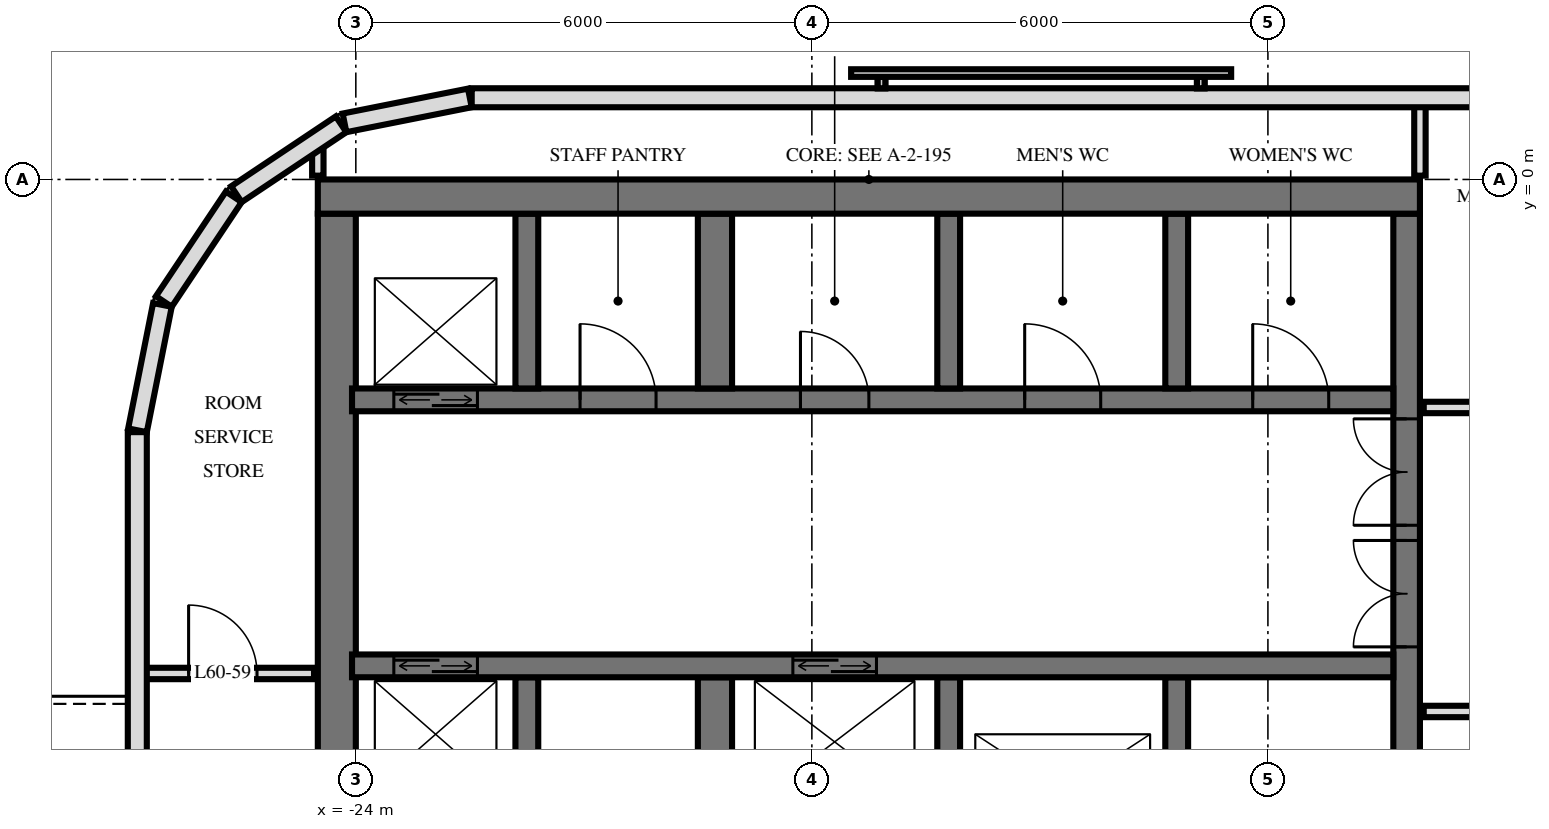
"""IFC4 building model, lengths in metres.
Left out: names, types, materials, properties, quantities, classifications, styles, units other than length and angle.
Written with IfcOpenShell. Run it as: python <this file> out.ifc"""

import sys

from ifc_helpers import new_model, si_unit, direction, frame, frame_2d, origin, place, context, subcontext, project, spatial, rectangle, extrude, element, fill, save


model = new_model("IFC4")
c1 = context("Model", 3, precision=1e-05, world=origin(), true_north=direction((0.0, 1.0)))
c2 = subcontext(c1, "Body", "Model", "MODEL_VIEW")
j1 = project(units=[si_unit("LENGTHUNIT", "METRE"), si_unit("PLANEANGLEUNIT", "RADIAN")], contexts=[c1])
p1 = place(None, origin())
s1 = spatial("IfcSite", under=j1, at=p1, CompositionType="ELEMENT")
p2 = place(p1, origin())
s2 = spatial("IfcBuilding", under=s1, at=p2, CompositionType="ELEMENT")
p3 = place(p2, frame((0.0, 0.0, 229.1)))
s3 = spatial("IfcBuildingStorey", under=s2, at=p3, CompositionType="ELEMENT", Elevation=229.1)
p4 = place(p3, frame((-24.5, -0.225, 0.0), z_axis=(0.0, 0.0, 1.0), x_axis=(1.0, 0.0, 0.0)))
e1 = element("IfcWall", 1, at=p4, inside=s3, PredefinedType="SHEAR", context=c2, shape_type="SweptSolid", body=[
    extrude(rectangle(XDim=14.5, YDim=0.45, at=frame_2d((7.25, 0.0))), origin(), (0.0, 0.0, 1.0), 3.5),
])
p5 = place(p3, frame((-10.175, -14.55, 0.0), z_axis=(0.0, 0.0, 1.0), x_axis=(0.0, 1.0, 0.0)))
e2 = element("IfcWall", 2, at=p5, inside=s3, PredefinedType="SHEAR", context=c2, shape_type="SweptSolid", body=[
    extrude(rectangle(XDim=14.1, YDim=0.35, at=frame_2d((7.05, 0.0))), origin(), (0.0, 0.0, 1.0), 3.5),
])
p6 = place(p5, frame((8.4, 0.0, 0.0)))
e3 = element("IfcOpeningElement", 3, at=p6, cuts=e2, PredefinedType="OPENING", context=c2, shape_type="SweptSolid", body=[
    extrude(rectangle(XDim=1.4, YDim=2.4, at=frame_2d((0.7, 1.2))), frame((0.0, 0.185, 0.0), z_axis=(0.0, -1.0, 0.0), x_axis=(1.0, 0.0, 0.0)), (0.0, 0.0, 1.0), 0.37),
])
p7 = place(p5, frame((10.0, 0.0, 0.0)))
e4 = element("IfcOpeningElement", 4, at=p7, cuts=e2, PredefinedType="OPENING", context=c2, shape_type="SweptSolid", body=[
    extrude(rectangle(XDim=1.4, YDim=2.4, at=frame_2d((0.7, 1.2))), frame((0.0, 0.185, 0.0), z_axis=(0.0, -1.0, 0.0), x_axis=(1.0, 0.0, 0.0)), (0.0, 0.0, 1.0), 0.37),
])
p8 = place(p5, frame((4.0, 0.0, 0.0)))
e5 = element("IfcOpeningElement", 5, at=p8, cuts=e2, PredefinedType="OPENING", context=c2, shape_type="SweptSolid", body=[
    extrude(rectangle(XDim=1.2, YDim=2.1, at=frame_2d((0.6, 1.05))), frame((0.0, 0.185, 0.0), z_axis=(0.0, -1.0, 0.0), x_axis=(1.0, 0.0, 0.0)), (0.0, 0.0, 1.0), 0.37),
])
p9 = place(p3, frame((-24.25, -14.55, 0.0), z_axis=(0.0, 0.0, 1.0), x_axis=(0.0, 1.0, 0.0)))
e6 = element("IfcWall", 6, at=p9, inside=s3, PredefinedType="SHEAR", context=c2, shape_type="SweptSolid", body=[
    extrude(rectangle(XDim=14.1, YDim=0.5, at=frame_2d((7.05, 0.0))), origin(), (0.0, 0.0, 1.0), 3.5),
])
p10 = place(p3, frame((-24.05, -2.9, 0.0), z_axis=(0.0, 0.0, 1.0), x_axis=(1.0, 0.0, 0.0)))
e7 = element("IfcWall", 7, at=p10, inside=s3, PredefinedType="SHEAR", context=c2, shape_type="SweptSolid", body=[
    extrude(rectangle(XDim=13.7, YDim=0.3, at=frame_2d((6.85, 0.0))), origin(), (0.0, 0.0, 1.0), 3.5),
])
p11 = place(p10, frame((0.55, 0.0, 0.0)))
e8 = element("IfcOpeningElement", 8, at=p11, cuts=e7, PredefinedType="OPENING", context=c2, shape_type="SweptSolid", body=[
    extrude(rectangle(XDim=1.1, YDim=2.1, at=frame_2d((0.55, 1.05))), frame((0.0, 0.16, 0.0), z_axis=(0.0, -1.0, 0.0), x_axis=(1.0, 0.0, 0.0)), (0.0, 0.0, 1.0), 0.32),
])
p12 = place(p10, frame((5.9, 0.0, 0.0)))
e9 = element("IfcOpeningElement", 9, at=p12, cuts=e7, PredefinedType="OPENING", context=c2, shape_type="SweptSolid", body=[
    extrude(rectangle(XDim=0.9, YDim=2.1, at=frame_2d((0.45, 1.05))), frame((0.0, 0.16, 0.0), z_axis=(0.0, -1.0, 0.0), x_axis=(1.0, 0.0, 0.0)), (0.0, 0.0, 1.0), 0.32),
])
p13 = place(p10, frame((11.85, 0.0, 0.0)))
e10 = element("IfcOpeningElement", 10, at=p13, cuts=e7, PredefinedType="OPENING", context=c2, shape_type="SweptSolid", body=[
    extrude(rectangle(XDim=1.0, YDim=2.1, at=frame_2d((0.5, 1.05))), frame((0.0, 0.16, 0.0), z_axis=(0.0, -1.0, 0.0), x_axis=(1.0, 0.0, 0.0)), (0.0, 0.0, 1.0), 0.32),
])
p14 = place(p10, frame((8.85, 0.0, 0.0)))
e11 = element("IfcOpeningElement", 11, at=p14, cuts=e7, PredefinedType="OPENING", context=c2, shape_type="SweptSolid", body=[
    extrude(rectangle(XDim=1.0, YDim=2.1, at=frame_2d((0.5, 1.05))), frame((0.0, 0.16, 0.0), z_axis=(0.0, -1.0, 0.0), x_axis=(1.0, 0.0, 0.0)), (0.0, 0.0, 1.0), 0.32),
])
p15 = place(p10, frame((3.0, 0.0, 0.0)))
e12 = element("IfcOpeningElement", 12, at=p15, cuts=e7, PredefinedType="OPENING", context=c2, shape_type="SweptSolid", body=[
    extrude(rectangle(XDim=1.0, YDim=2.1, at=frame_2d((0.5, 1.05))), frame((0.0, 0.16, 0.0), z_axis=(0.0, -1.0, 0.0), x_axis=(1.0, 0.0, 0.0)), (0.0, 0.0, 1.0), 0.32),
])
p16 = place(p3, frame((-24.05, -6.4, 0.0), z_axis=(0.0, 0.0, 1.0), x_axis=(1.0, 0.0, 0.0)))
e13 = element("IfcWall", 13, at=p16, inside=s3, PredefinedType="SHEAR", context=c2, shape_type="SweptSolid", body=[
    extrude(rectangle(XDim=13.7, YDim=0.3, at=frame_2d((6.85, 0.0))), origin(), (0.0, 0.0, 1.0), 3.5),
])
p17 = place(p16, frame((0.55, 0.0, 0.0)))
e14 = element("IfcOpeningElement", 14, at=p17, cuts=e13, PredefinedType="OPENING", context=c2, shape_type="SweptSolid", body=[
    extrude(rectangle(XDim=1.1, YDim=2.1, at=frame_2d((0.55, 1.05))), frame((0.0, 0.16, 0.0), z_axis=(0.0, -1.0, 0.0), x_axis=(1.0, 0.0, 0.0)), (0.0, 0.0, 1.0), 0.32),
])
p18 = place(p16, frame((5.8, 0.0, 0.0)))
e15 = element("IfcOpeningElement", 15, at=p18, cuts=e13, PredefinedType="OPENING", context=c2, shape_type="SweptSolid", body=[
    extrude(rectangle(XDim=1.1, YDim=2.1, at=frame_2d((0.55, 1.05))), frame((0.0, 0.16, 0.0), z_axis=(0.0, -1.0, 0.0), x_axis=(1.0, 0.0, 0.0)), (0.0, 0.0, 1.0), 0.32),
])
for number, where, z_axis, x_axis in (
    (16, (-13.2, -2.75, 0.0), (0.0, 0.0, 1.0), (0.0, 1.0, 0.0)),
    (17, (-13.2, -8.85, 0.0), (0.0, 0.0, 1.0), (0.0, 1.0, 0.0)),
    (18, (-16.2, -2.75, 0.0), (0.0, 0.0, 1.0), (0.0, 1.0, 0.0)),
    (19, (-16.2, -8.85, 0.0), (0.0, 0.0, 1.0), (0.0, 1.0, 0.0)),
):
    element("IfcWall", number, at=place(p3, frame(where, z_axis=z_axis, x_axis=x_axis)), inside=s3, PredefinedType="SHEAR", context=c2, shape_type="SweptSolid", body=[
        extrude(rectangle(XDim=2.3, YDim=0.3, at=frame_2d((1.15, 0.0))), origin(), (0.0, 0.0, 1.0), 3.5),
    ])
for number, where, z_axis, x_axis in (
    (20, (-19.275, -2.75, 0.0), (0.0, 0.0, 1.0), (0.0, 1.0, 0.0)),
    (21, (-19.275, -8.85, 0.0), (0.0, 0.0, 1.0), (0.0, 1.0, 0.0)),
):
    element("IfcWall", number, at=place(p3, frame(where, z_axis=z_axis, x_axis=x_axis)), inside=s3, PredefinedType="SHEAR", context=c2, shape_type="SweptSolid", body=[
        extrude(rectangle(XDim=2.3, YDim=0.45, at=frame_2d((1.15, 0.0))), origin(), (0.0, 0.0, 1.0), 3.5),
    ])
for number, where, z_axis, x_axis in (
    (22, (-21.75, -2.75, 0.0), (0.0, 0.0, 1.0), (0.0, 1.0, 0.0)),
    (23, (-21.75, -8.85, 0.0), (0.0, 0.0, 1.0), (0.0, 1.0, 0.0)),
):
    element("IfcWall", number, at=place(p3, frame(where, z_axis=z_axis, x_axis=x_axis)), inside=s3, PredefinedType="SHEAR", context=c2, shape_type="SweptSolid", body=[
        extrude(rectangle(XDim=2.3, YDim=0.3, at=frame_2d((1.15, 0.0))), origin(), (0.0, 0.0, 1.0), 3.5),
    ])
p19 = place(p3, frame((22.475, 1.075, 0.0), z_axis=(0.0, 0.0, 1.0), x_axis=(-1.0, 0.0, 0.0)))
e24 = element("IfcWall", 24, at=p19, inside=s3, PredefinedType="SOLIDWALL", context=c2, shape_type="SweptSolid", body=[
    extrude(rectangle(XDim=44.951, YDim=0.25, at=frame_2d((22.475, 0.0))), origin(), (0.0, 0.0, 1.0), 3.22),
])
p20 = place(p19, frame((15.275, 0.0, 0.9)))
e25 = element("IfcOpeningElement", 25, at=p20, cuts=e24, PredefinedType="OPENING", context=c2, shape_type="SweptSolid", body=[
    extrude(rectangle(XDim=2.4, YDim=1.5, at=frame_2d((1.2, 0.75))), frame((0.0, 0.135, 0.0), z_axis=(0.0, -1.0, 0.0), x_axis=(1.0, 0.0, 0.0)), (0.0, 0.0, 1.0), 0.27),
])
p21 = place(p19, frame((18.275, 0.0, 0.9)))
e26 = element("IfcOpeningElement", 26, at=p21, cuts=e24, PredefinedType="OPENING", context=c2, shape_type="SweptSolid", body=[
    extrude(rectangle(XDim=2.4, YDim=1.5, at=frame_2d((1.2, 0.75))), frame((0.0, 0.135, 0.0), z_axis=(0.0, -1.0, 0.0), x_axis=(1.0, 0.0, 0.0)), (0.0, 0.0, 1.0), 0.27),
])
p22 = place(p19, frame((29.275, 0.0, 0.9)))
e27 = element("IfcOpeningElement", 27, at=p22, cuts=e24, PredefinedType="OPENING", context=c2, shape_type="SweptSolid", body=[
    extrude(rectangle(XDim=2.4, YDim=1.5, at=frame_2d((1.2, 0.75))), frame((0.0, 0.135, 0.0), z_axis=(0.0, -1.0, 0.0), x_axis=(1.0, 0.0, 0.0)), (0.0, 0.0, 1.0), 0.27),
])
p23 = place(p3, frame((-22.5, 1.073, 0.0), z_axis=(0.0, 0.0, 1.0), x_axis=(-0.980803419081, -0.194999110559, 0.0)))
e28 = element("IfcWall", 28, at=p23, inside=s3, PredefinedType="SOLIDWALL", context=c2, shape_type="SweptSolid", body=[
    extrude(rectangle(XDim=1.681, YDim=0.25, at=frame_2d((0.841, 0.0))), origin(), (0.0, 0.0, 1.0), 3.22),
])
for number, where, z_axis, x_axis in (
    (29, (-24.194, 0.726, 0.0), (0.0, 0.0, 1.0), (-0.831, -0.556, 0.0)),
    (30, (-25.606, -0.229, 0.0), (0.0, 0.0, 1.0), (-0.556, -0.831, 0.0)),
):
    element("IfcWall", number, at=place(p3, frame(where, z_axis=z_axis, x_axis=x_axis)), inside=s3, PredefinedType="SOLIDWALL", context=c2, shape_type="SweptSolid", body=[
        extrude(rectangle(XDim=1.656, YDim=0.25, at=frame_2d((0.828, 0.0))), origin(), (0.0, 0.0, 1.0), 3.22),
    ])
p24 = place(p3, frame((-26.545, -1.651, 0.0), z_axis=(0.0, 0.0, 1.0), x_axis=(-0.194999110559, -0.980803419081, 0.0)))
e31 = element("IfcWall", 31, at=p24, inside=s3, PredefinedType="SOLIDWALL", context=c2, shape_type="SweptSolid", body=[
    extrude(rectangle(XDim=1.681, YDim=0.25, at=frame_2d((0.841, 0.0))), origin(), (0.0, 0.0, 1.0), 3.22),
])
p25 = place(p3, frame((-26.875, -3.325, 0.0), z_axis=(0.0, 0.0, 1.0), x_axis=(0.0, -1.0, 0.0)))
e32 = element("IfcWall", 32, at=p25, inside=s3, PredefinedType="SOLIDWALL", context=c2, shape_type="SweptSolid", body=[
    extrude(rectangle(XDim=21.551, YDim=0.25, at=frame_2d((10.775, 0.0))), origin(), (0.0, 0.0, 1.0), 3.22),
])
p26 = place(p25, frame((6.575, 0.0, 0.0)))
e33 = element("IfcOpeningElement", 33, at=p26, cuts=e32, PredefinedType="OPENING", context=c2, shape_type="SweptSolid", body=[
    extrude(rectangle(XDim=1.8, YDim=2.4, at=frame_2d((0.9, 1.2))), frame((0.0, 0.135, 0.0), z_axis=(0.0, -1.0, 0.0), x_axis=(1.0, 0.0, 0.0)), (0.0, 0.0, 1.0), 0.27),
])
p27 = place(p25, frame((9.425, 0.0, 0.9)))
e34 = element("IfcOpeningElement", 34, at=p27, cuts=e32, PredefinedType="OPENING", context=c2, shape_type="SweptSolid", body=[
    extrude(rectangle(XDim=1.8, YDim=1.5, at=frame_2d((0.9, 0.75))), frame((0.0, 0.135, 0.0), z_axis=(0.0, -1.0, 0.0), x_axis=(1.0, 0.0, 0.0)), (0.0, 0.0, 1.0), 0.27),
])
p28 = place(p25, frame((12.575, 0.0, 0.9)))
e35 = element("IfcOpeningElement", 35, at=p28, cuts=e32, PredefinedType="OPENING", context=c2, shape_type="SweptSolid", body=[
    extrude(rectangle(XDim=1.2, YDim=1.5, at=frame_2d((0.6, 0.75))), frame((0.0, 0.135, 0.0), z_axis=(0.0, -1.0, 0.0), x_axis=(1.0, 0.0, 0.0)), (0.0, 0.0, 1.0), 0.27),
])
p29 = place(p25, frame((15.275, 0.0, 0.0)))
e36 = element("IfcOpeningElement", 36, at=p29, cuts=e32, PredefinedType="OPENING", context=c2, shape_type="SweptSolid", body=[
    extrude(rectangle(XDim=1.8, YDim=2.4, at=frame_2d((0.9, 1.2))), frame((0.0, 0.135, 0.0), z_axis=(0.0, -1.0, 0.0), x_axis=(1.0, 0.0, 0.0)), (0.0, 0.0, 1.0), 0.27),
])
p30 = place(p25, frame((18.875, 0.0, 0.0)))
e37 = element("IfcOpeningElement", 37, at=p30, cuts=e32, PredefinedType="OPENING", context=c2, shape_type="SweptSolid", body=[
    extrude(rectangle(XDim=1.8, YDim=2.4, at=frame_2d((0.9, 1.2))), frame((0.0, 0.135, 0.0), z_axis=(0.0, -1.0, 0.0), x_axis=(1.0, 0.0, 0.0)), (0.0, 0.0, 1.0), 0.27),
])
p31 = place(p3, frame((-10.0, 0.05, 0.0), z_axis=(0.0, 0.0, 1.0), x_axis=(0.0, 1.0, 0.0)))
e38 = element("IfcWall", 38, at=p31, inside=s3, PredefinedType="PARTITIONING", context=c2, shape_type="SweptSolid", body=[
    extrude(rectangle(XDim=0.97, YDim=0.15, at=frame_2d((0.485, 0.0))), origin(), (0.0, 0.0, 1.0), 3.22),
])
p32 = place(p3, frame((-24.5, 0.05, 0.0), z_axis=(0.0, 0.0, 1.0), x_axis=(0.0, 1.0, 0.0)))
e39 = element("IfcWall", 39, at=p32, inside=s3, PredefinedType="PARTITIONING", context=c2, shape_type="SweptSolid", body=[
    extrude(rectangle(XDim=0.405, YDim=0.15, at=frame_2d((0.203, 0.0))), origin(), (0.0, 0.0, 1.0), 3.22),
])
p33 = place(p3, frame((-9.95, -7.0, 0.0), z_axis=(0.0, 0.0, 1.0), x_axis=(1.0, 0.0, 0.0)))
e40 = element("IfcWall", 40, at=p33, inside=s3, PredefinedType="PARTITIONING", context=c2, shape_type="SweptSolid", body=[
    extrude(rectangle(XDim=19.9, YDim=0.15, at=frame_2d((9.95, 0.0))), origin(), (0.0, 0.0, 1.0), 3.22),
])
p34 = place(p33, frame((9.45, 0.0, 0.0)))
e41 = element("IfcOpeningElement", 41, at=p34, cuts=e40, PredefinedType="OPENING", context=c2, shape_type="SweptSolid", body=[
    extrude(rectangle(XDim=1.0, YDim=2.1, at=frame_2d((0.5, 1.05))), frame((0.0, 0.085, 0.0), z_axis=(0.0, -1.0, 0.0), x_axis=(1.0, 0.0, 0.0)), (0.0, 0.0, 1.0), 0.17),
])
p35 = place(p33, frame((3.45, 0.0, 0.0)))
e42 = element("IfcOpeningElement", 42, at=p35, cuts=e40, PredefinedType="OPENING", context=c2, shape_type="SweptSolid", body=[
    extrude(rectangle(XDim=1.0, YDim=2.1, at=frame_2d((0.5, 1.05))), frame((0.0, 0.085, 0.0), z_axis=(0.0, -1.0, 0.0), x_axis=(1.0, 0.0, 0.0)), (0.0, 0.0, 1.0), 0.17),
])
p36 = place(p3, frame((-26.82, -6.5, 0.0), z_axis=(0.0, 0.0, 1.0), x_axis=(1.0, 0.0, 0.0)))
e43 = element("IfcWall", 43, at=p36, inside=s3, PredefinedType="PARTITIONING", context=c2, shape_type="SweptSolid", body=[
    extrude(rectangle(XDim=2.27, YDim=0.15, at=frame_2d((1.135, 0.0))), origin(), (0.0, 0.0, 1.0), 3.22),
])
p37 = place(p36, frame((0.62, 0.0, 0.0)))
e44 = element("IfcOpeningElement", 44, at=p37, cuts=e43, PredefinedType="OPENING", context=c2, shape_type="SweptSolid", body=[
    extrude(rectangle(XDim=0.9, YDim=2.1, at=frame_2d((0.45, 1.05))), frame((0.0, 0.085, 0.0), z_axis=(0.0, -1.0, 0.0), x_axis=(1.0, 0.0, 0.0)), (0.0, 0.0, 1.0), 0.17),
])
p38 = place(p3, frame((-9.95, -3.0, 0.0), z_axis=(0.0, 0.0, 1.0), x_axis=(1.0, 0.0, 0.0)))
e45 = element("IfcWall", 45, at=p38, inside=s3, PredefinedType="PARTITIONING", context=c2, shape_type="SweptSolid", body=[
    extrude(rectangle(XDim=19.9, YDim=0.15, at=frame_2d((9.95, 0.0))), origin(), (0.0, 0.0, 1.0), 3.22),
])
p39 = place(p38, frame((1.45, 0.0, 0.0)))
e46 = element("IfcOpeningElement", 46, at=p39, cuts=e45, PredefinedType="OPENING", context=c2, shape_type="SweptSolid", body=[
    extrude(rectangle(XDim=1.0, YDim=2.1, at=frame_2d((0.5, 1.05))), frame((0.0, 0.085, 0.0), z_axis=(0.0, -1.0, 0.0), x_axis=(1.0, 0.0, 0.0)), (0.0, 0.0, 1.0), 0.17),
])
p40 = place(p38, frame((4.95, 0.0, 0.0)))
e47 = element("IfcOpeningElement", 47, at=p40, cuts=e45, PredefinedType="OPENING", context=c2, shape_type="SweptSolid", body=[
    extrude(rectangle(XDim=1.0, YDim=2.1, at=frame_2d((0.5, 1.05))), frame((0.0, 0.085, 0.0), z_axis=(0.0, -1.0, 0.0), x_axis=(1.0, 0.0, 0.0)), (0.0, 0.0, 1.0), 0.17),
])
p41 = place(p38, frame((7.7, 0.0, 0.0)))
e48 = element("IfcOpeningElement", 48, at=p41, cuts=e45, PredefinedType="OPENING", context=c2, shape_type="SweptSolid", body=[
    extrude(rectangle(XDim=1.0, YDim=2.1, at=frame_2d((0.5, 1.05))), frame((0.0, 0.085, 0.0), z_axis=(0.0, -1.0, 0.0), x_axis=(1.0, 0.0, 0.0)), (0.0, 0.0, 1.0), 0.17),
])
p42 = place(p38, frame((14.2, 0.0, 0.0)))
e49 = element("IfcOpeningElement", 49, at=p42, cuts=e45, PredefinedType="OPENING", context=c2, shape_type="SweptSolid", body=[
    extrude(rectangle(XDim=1.0, YDim=2.1, at=frame_2d((0.5, 1.05))), frame((0.0, 0.085, 0.0), z_axis=(0.0, -1.0, 0.0), x_axis=(1.0, 0.0, 0.0)), (0.0, 0.0, 1.0), 0.17),
])
p43 = place(p11, origin())
e50 = element("IfcDoor", 50, at=p43, inside=s3, OperationType="DOUBLE_DOOR_SLIDING", PredefinedType="USERDEFINED", context=c2, shape_type="SweptSolid", body=[
    extrude(rectangle(XDim=1.1, YDim=2.1, at=frame_2d((0.55, 1.05))), frame((0.0, 0.025, 0.0), z_axis=(0.0, -1.0, 0.0), x_axis=(1.0, 0.0, 0.0)), (0.0, 0.0, 1.0), 0.05),
])
fill(e8, e50)
p44 = place(p17, origin())
e51 = element("IfcDoor", 51, at=p44, inside=s3, OperationType="DOUBLE_DOOR_SLIDING", PredefinedType="USERDEFINED", context=c2, shape_type="SweptSolid", body=[
    extrude(rectangle(XDim=1.1, YDim=2.1, at=frame_2d((0.55, 1.05))), frame((0.0, 0.025, 0.0), z_axis=(0.0, -1.0, 0.0), x_axis=(1.0, 0.0, 0.0)), (0.0, 0.0, 1.0), 0.05),
])
fill(e14, e51)
p45 = place(p18, origin())
e52 = element("IfcDoor", 52, at=p45, inside=s3, OperationType="DOUBLE_DOOR_SLIDING", PredefinedType="USERDEFINED", context=c2, shape_type="SweptSolid", body=[
    extrude(rectangle(XDim=1.1, YDim=2.1, at=frame_2d((0.55, 1.05))), frame((0.0, 0.025, 0.0), z_axis=(0.0, -1.0, 0.0), x_axis=(1.0, 0.0, 0.0)), (0.0, 0.0, 1.0), 0.05),
])
fill(e15, e52)
p46 = place(p6, origin())
e53 = element("IfcDoor", 53, at=p46, inside=s3, OperationType="DOUBLE_DOOR_SINGLE_SWING", PredefinedType="DOOR", context=c2, shape_type="SweptSolid", body=[
    extrude(rectangle(XDim=1.4, YDim=2.4, at=frame_2d((0.7, 1.2))), frame((0.0, 0.025, 0.0), z_axis=(0.0, -1.0, 0.0), x_axis=(1.0, 0.0, 0.0)), (0.0, 0.0, 1.0), 0.05),
])
fill(e3, e53)
p47 = place(p7, origin())
e54 = element("IfcDoor", 54, at=p47, inside=s3, OperationType="DOUBLE_DOOR_SINGLE_SWING", PredefinedType="DOOR", context=c2, shape_type="SweptSolid", body=[
    extrude(rectangle(XDim=1.4, YDim=2.4, at=frame_2d((0.7, 1.2))), frame((0.0, 0.025, 0.0), z_axis=(0.0, -1.0, 0.0), x_axis=(1.0, 0.0, 0.0)), (0.0, 0.0, 1.0), 0.05),
])
fill(e4, e54)
p48 = place(p12, origin())
e55 = element("IfcDoor", 55, at=p48, inside=s3, OperationType="SINGLE_SWING_RIGHT", PredefinedType="DOOR", context=c2, shape_type="SweptSolid", body=[
    extrude(rectangle(XDim=0.9, YDim=2.1, at=frame_2d((0.45, 1.05))), frame((0.0, 0.025, 0.0), z_axis=(0.0, -1.0, 0.0), x_axis=(1.0, 0.0, 0.0)), (0.0, 0.0, 1.0), 0.05),
])
fill(e9, e55)
p49 = place(p13, origin())
e56 = element("IfcDoor", 56, at=p49, inside=s3, OperationType="SINGLE_SWING_RIGHT", PredefinedType="DOOR", context=c2, shape_type="SweptSolid", body=[
    extrude(rectangle(XDim=1.0, YDim=2.1, at=frame_2d((0.5, 1.05))), frame((0.0, 0.025, 0.0), z_axis=(0.0, -1.0, 0.0), x_axis=(1.0, 0.0, 0.0)), (0.0, 0.0, 1.0), 0.05),
])
fill(e10, e56)
p50 = place(p14, origin())
e57 = element("IfcDoor", 57, at=p50, inside=s3, OperationType="SINGLE_SWING_RIGHT", PredefinedType="DOOR", context=c2, shape_type="SweptSolid", body=[
    extrude(rectangle(XDim=1.0, YDim=2.1, at=frame_2d((0.5, 1.05))), frame((0.0, 0.025, 0.0), z_axis=(0.0, -1.0, 0.0), x_axis=(1.0, 0.0, 0.0)), (0.0, 0.0, 1.0), 0.05),
])
fill(e11, e57)
p51 = place(p15, origin())
e58 = element("IfcDoor", 58, at=p51, inside=s3, OperationType="SINGLE_SWING_RIGHT", PredefinedType="DOOR", context=c2, shape_type="SweptSolid", body=[
    extrude(rectangle(XDim=1.0, YDim=2.1, at=frame_2d((0.5, 1.05))), frame((0.0, 0.025, 0.0), z_axis=(0.0, -1.0, 0.0), x_axis=(1.0, 0.0, 0.0)), (0.0, 0.0, 1.0), 0.05),
])
fill(e12, e58)
p52 = place(p37, origin())
e59 = element("IfcDoor", 59, at=p52, inside=s3, OperationType="SINGLE_SWING_RIGHT", PredefinedType="DOOR", context=c2, shape_type="SweptSolid", body=[
    extrude(rectangle(XDim=0.9, YDim=2.1, at=frame_2d((0.45, 1.05))), frame((0.0, 0.025, 0.0), z_axis=(0.0, -1.0, 0.0), x_axis=(1.0, 0.0, 0.0)), (0.0, 0.0, 1.0), 0.05),
])
fill(e44, e59)
save(model, sys.argv[1])
